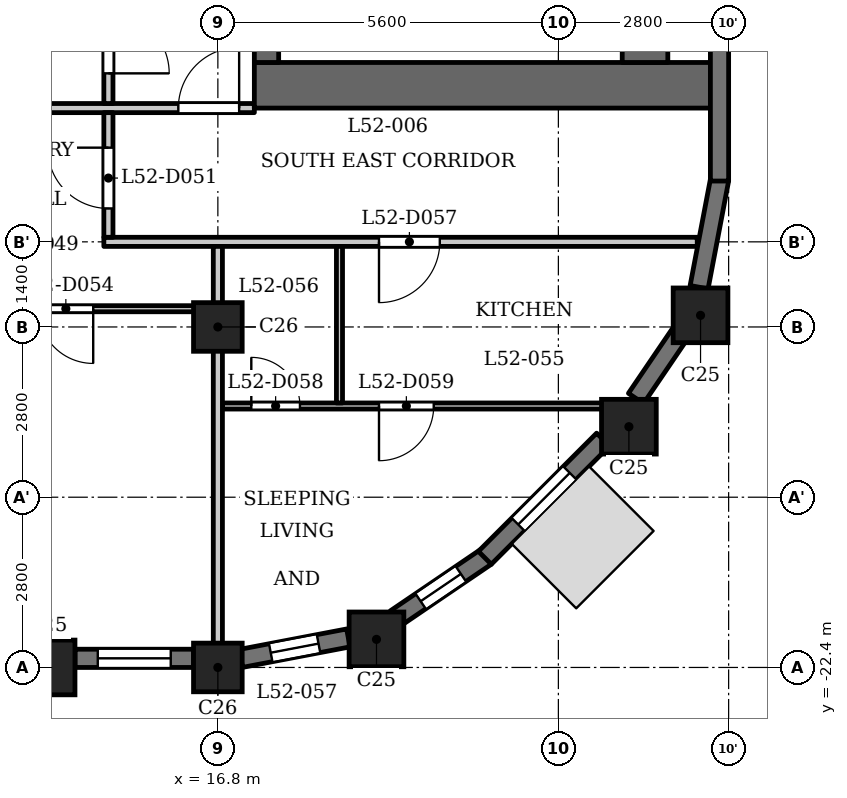
"""IFC4 building model, lengths in metres.
Left out: names, types, materials, properties, quantities, classifications, styles, units other than length and angle.
Written with IfcOpenShell. Run it as: python <this file> out.ifc"""

import sys

from ifc_helpers import new_model, si_unit, direction, frame, frame_2d, origin, origin_2d, place, context, subcontext, project, spatial, rectangle, extrude, element, fill, save


model = new_model("IFC4")
c1 = context("Model", 3, precision=1e-05, world=origin(), true_north=direction((0.0, 1.0)))
c2 = subcontext(c1, "Body", "Model", "MODEL_VIEW")
j1 = project(units=[si_unit("LENGTHUNIT", "METRE"), si_unit("PLANEANGLEUNIT", "RADIAN")], contexts=[c1])
p1 = place(None, origin())
s1 = spatial("IfcSite", under=j1, at=p1, CompositionType="ELEMENT")
p2 = place(p1, origin())
s2 = spatial("IfcBuilding", under=s1, at=p2, CompositionType="ELEMENT")
p3 = place(p2, frame((0.0, 0.0, 202.9)))
s3 = spatial("IfcBuildingStorey", under=s2, at=p3, CompositionType="ELEMENT", Elevation=202.9)
for number, where, z_axis, x_axis in (
    (1, (14.0, -22.4, 0.0), (0.0, 0.0, 1.0), (1.0, 0.0, 0.0)),
    (2, (19.409, -21.938, 0.0), (0.0, 0.0, 1.0), (1.0, 0.0, 0.0)),
    (3, (23.56, -18.44, 0.0), (0.0, 0.0, 1.0), (1.0, 0.0, 0.0)),
    (4, (24.738, -16.609, 0.0), (0.0, 0.0, 1.0), (1.0, 0.0, 0.0)),
):
    element("IfcColumn", number, at=place(p3, frame(where, z_axis=z_axis, x_axis=x_axis)), inside=s3, PredefinedType="COLUMN", context=c2, shape_type="SweptSolid", body=[
        extrude(rectangle(XDim=0.9, YDim=0.9, at=origin_2d()), origin(), (0.0, 0.0, 1.0), 3.5),
    ])
for number, where, z_axis, x_axis in (
    (5, (16.8, -22.4, 0.0), (0.0, 0.0, 1.0), (1.0, 0.0, 0.0)),
    (6, (16.8, -16.8, 0.0), (0.0, 0.0, 1.0), (1.0, 0.0, 0.0)),
):
    element("IfcColumn", number, at=place(p3, frame(where, z_axis=z_axis, x_axis=x_axis)), inside=s3, PredefinedType="COLUMN", context=c2, shape_type="SweptSolid", body=[
        extrude(rectangle(XDim=0.8, YDim=0.8, at=origin_2d()), origin(), (0.0, 0.0, 1.0), 3.5),
    ])
p4 = place(p3, frame((14.45, -22.25, 0.0), z_axis=(0.0, 0.0, 1.0), x_axis=(1.0, 0.0, 0.0)))
e7 = element("IfcWall", 7, at=p4, inside=s3, PredefinedType="SOLIDWALL", context=c2, shape_type="SweptSolid", body=[
    extrude(rectangle(XDim=1.95, YDim=0.3, at=frame_2d((0.975, 0.0))), origin(), (0.0, 0.0, 1.0), 2.5),
])
p5 = place(p4, frame((0.375, 0.0, 0.6)))
e8 = element("IfcOpeningElement", 8, at=p5, cuts=e7, PredefinedType="OPENING", context=c2, shape_type="SweptSolid", body=[
    extrude(rectangle(XDim=1.2, YDim=1.55, at=frame_2d((0.6, 0.775))), frame((0.0, 0.16, 0.0), z_axis=(0.0, -1.0, 0.0), x_axis=(1.0, 0.0, 0.0)), (0.0, 0.0, 1.0), 0.32),
])
p6 = place(p3, frame((17.179, -22.251, 0.0), z_axis=(0.0, 0.0, 1.0), x_axis=(0.98230529033, 0.187286722942, 0.0)))
e9 = element("IfcWall", 9, at=p6, inside=s3, PredefinedType="SOLIDWALL", context=c2, shape_type="SweptSolid", body=[
    extrude(rectangle(XDim=1.799, YDim=0.3, at=frame_2d((0.899, 0.0))), origin(), (0.0, 0.0, 1.0), 2.5),
])
p7 = place(p6, frame((0.5, 0.0, 0.6)))
e10 = element("IfcOpeningElement", 10, at=p7, cuts=e9, PredefinedType="OPENING", context=c2, shape_type="SweptSolid", body=[
    extrude(rectangle(XDim=0.8, YDim=1.55, at=frame_2d((0.4, 0.775))), frame((0.0, 0.16, 0.0), z_axis=(0.0, -1.0, 0.0), x_axis=(1.0, 0.0, 0.0)), (0.0, 0.0, 1.0), 0.32),
])
p8 = place(p3, frame((19.719, -21.594, 0.0), z_axis=(0.0, 0.0, 1.0), x_axis=(0.827067282455, 0.562102935673, 0.0)))
e11 = element("IfcWall", 11, at=p8, inside=s3, PredefinedType="SOLIDWALL", context=c2, shape_type="SweptSolid", body=[
    extrude(rectangle(XDim=1.806, YDim=0.3, at=frame_2d((0.903, 0.0))), origin(), (0.0, 0.0, 1.0), 2.5),
])
p9 = place(p8, frame((0.503, 0.0, 0.6)))
e12 = element("IfcOpeningElement", 12, at=p9, cuts=e11, PredefinedType="OPENING", context=c2, shape_type="SweptSolid", body=[
    extrude(rectangle(XDim=0.8, YDim=1.55, at=frame_2d((0.4, 0.775))), frame((0.0, 0.16, 0.0), z_axis=(0.0, -1.0, 0.0), x_axis=(1.0, 0.0, 0.0)), (0.0, 0.0, 1.0), 0.32),
])
p10 = place(p3, frame((21.191, -20.597, 0.0), z_axis=(0.0, 0.0, 1.0), x_axis=(0.707106781187, 0.707106781187, 0.0)))
e13 = element("IfcWall", 13, at=p10, inside=s3, PredefinedType="SOLIDWALL", context=c2, shape_type="SweptSolid", body=[
    extrude(rectangle(XDim=2.75, YDim=0.3, at=frame_2d((1.375, 0.0))), origin(), (0.0, 0.0, 1.0), 2.5),
])
p11 = place(p10, frame((0.775, 0.0, 0.6)))
e14 = element("IfcOpeningElement", 14, at=p11, cuts=e13, PredefinedType="OPENING", context=c2, shape_type="SweptSolid", body=[
    extrude(rectangle(XDim=1.2, YDim=1.55, at=frame_2d((0.6, 0.775))), frame((0.0, 0.16, 0.0), z_axis=(0.0, -1.0, 0.0), x_axis=(1.0, 0.0, 0.0)), (0.0, 0.0, 1.0), 0.32),
])
p12 = place(p3, frame((23.676, -17.975, 0.0), z_axis=(0.0, 0.0, 1.0), x_axis=(0.56200149592, 0.827136215253, 0.0)))
e15 = element("IfcWall", 15, at=p12, inside=s3, PredefinedType="SOLIDWALL", context=c2, shape_type="SweptSolid", body=[
    extrude(rectangle(XDim=1.277, YDim=0.3, at=frame_2d((0.639, 0.0))), origin(), (0.0, 0.0, 1.0), 2.5),
])
p13 = place(p3, frame((24.714, -16.146, 0.0), z_axis=(0.0, 0.0, 1.0), x_axis=(0.187348135549, 0.982293579388, 0.0)))
e16 = element("IfcWall", 16, at=p13, inside=s3, PredefinedType="SOLIDWALL", context=c2, shape_type="SweptSolid", body=[
    extrude(rectangle(XDim=1.806, YDim=0.3, at=frame_2d((0.903, 0.0))), origin(), (0.0, 0.0, 1.0), 2.5),
])
p14 = place(p3, frame((25.05, -14.4, 0.0), z_axis=(0.0, 0.0, 1.0), x_axis=(0.0, 1.0, 0.0)))
e17 = element("IfcWall", 17, at=p14, inside=s3, PredefinedType="SOLIDWALL", context=c2, shape_type="SweptSolid", body=[
    extrude(rectangle(XDim=2.75, YDim=0.3, at=frame_2d((1.375, 0.0))), origin(), (0.0, 0.0, 1.0), 2.5),
])
p15 = place(p3, frame((17.4, -12.825, 0.0), z_axis=(0.0, 0.0, 1.0), x_axis=(1.0, 0.0, 0.0)))
e18 = element("IfcWall", 18, at=p15, inside=s3, PredefinedType="SHEAR", context=c2, shape_type="SweptSolid", body=[
    extrude(rectangle(XDim=7.6, YDim=0.75, at=frame_2d((3.8, 0.0))), origin(), (0.0, 0.0, 1.0), 3.2),
])
p16 = place(p3, frame((17.6, -12.45, 0.0), z_axis=(0.0, 0.0, 1.0), x_axis=(0.0, 1.0, 0.0)))
e19 = element("IfcWall", 19, at=p16, inside=s3, PredefinedType="SHEAR", context=c2, shape_type="SweptSolid", body=[
    extrude(rectangle(XDim=24.9, YDim=0.4, at=frame_2d((12.45, 0.0))), origin(), (0.0, 0.0, 1.0), 3.2),
])
p17 = place(p16, frame((8.65, 0.0, 0.0)))
e20 = element("IfcOpeningElement", 20, at=p17, cuts=e19, PredefinedType="OPENING", context=c2, shape_type="SweptSolid", body=[
    extrude(rectangle(XDim=0.9, YDim=2.1, at=frame_2d((0.45, 1.05))), frame((0.0, 0.21, 0.0), z_axis=(0.0, -1.0, 0.0), x_axis=(1.0, 0.0, 0.0)), (0.0, 0.0, 1.0), 0.42),
])
p18 = place(p16, frame((15.6, 0.0, 0.0)))
e21 = element("IfcOpeningElement", 21, at=p18, cuts=e19, PredefinedType="OPENING", context=c2, shape_type="SweptSolid", body=[
    extrude(rectangle(XDim=1.1, YDim=2.1, at=frame_2d((0.55, 1.05))), frame((0.0, 0.21, 0.0), z_axis=(0.0, -1.0, 0.0), x_axis=(1.0, 0.0, 0.0)), (0.0, 0.0, 1.0), 0.42),
])
p19 = place(p16, frame((18.0, 0.0, 0.0)))
e22 = element("IfcOpeningElement", 22, at=p19, cuts=e19, PredefinedType="OPENING", context=c2, shape_type="SweptSolid", body=[
    extrude(rectangle(XDim=1.1, YDim=2.1, at=frame_2d((0.55, 1.05))), frame((0.0, 0.21, 0.0), z_axis=(0.0, -1.0, 0.0), x_axis=(1.0, 0.0, 0.0)), (0.0, 0.0, 1.0), 0.42),
])
p20 = place(p16, frame((23.025, 0.0, 0.0)))
e23 = element("IfcOpeningElement", 23, at=p20, cuts=e19, PredefinedType="OPENING", context=c2, shape_type="SweptSolid", body=[
    extrude(rectangle(XDim=1.1, YDim=2.1, at=frame_2d((0.55, 1.05))), frame((0.0, 0.21, 0.0), z_axis=(0.0, -1.0, 0.0), x_axis=(1.0, 0.0, 0.0)), (0.0, 0.0, 1.0), 0.42),
])
p21 = place(p16, frame((0.775, 0.0, 0.0)))
e24 = element("IfcOpeningElement", 24, at=p21, cuts=e19, PredefinedType="OPENING", context=c2, shape_type="SweptSolid", body=[
    extrude(rectangle(XDim=1.1, YDim=2.1, at=frame_2d((0.55, 1.05))), frame((0.0, 0.21, 0.0), z_axis=(0.0, -1.0, 0.0), x_axis=(1.0, 0.0, 0.0)), (0.0, 0.0, 1.0), 0.42),
])
p22 = place(p16, frame((12.925, 0.0, 0.0)))
e25 = element("IfcOpeningElement", 25, at=p22, cuts=e19, PredefinedType="OPENING", context=c2, shape_type="SweptSolid", body=[
    extrude(rectangle(XDim=1.8, YDim=2.1, at=frame_2d((0.9, 1.05))), frame((0.0, 0.21, 0.0), z_axis=(0.0, -1.0, 0.0), x_axis=(1.0, 0.0, 0.0)), (0.0, 0.0, 1.0), 0.42),
])
p23 = place(p3, frame((23.825, -12.45, 0.0), z_axis=(0.0, 0.0, 1.0), x_axis=(0.0, 1.0, 0.0)))
e26 = element("IfcWall", 26, at=p23, inside=s3, PredefinedType="SHEAR", context=c2, shape_type="SweptSolid", body=[
    extrude(rectangle(XDim=24.9, YDim=0.75, at=frame_2d((12.45, 0.0))), origin(), (0.0, 0.0, 1.0), 3.2),
])
p24 = place(p3, frame((16.875, -18.1, 0.0), z_axis=(0.0, 0.0, 1.0), x_axis=(1.0, 0.0, 0.0)))
e27 = element("IfcWall", 27, at=p24, inside=s3, PredefinedType="PARTITIONING", context=c2, shape_type="SweptSolid", body=[
    extrude(rectangle(XDim=6.765, YDim=0.1, at=frame_2d((3.382, 0.0))), origin(), (0.0, 0.0, 1.0), 3.2),
])
p25 = place(p24, frame((0.475, 0.0, 0.0)))
e28 = element("IfcOpeningElement", 28, at=p25, cuts=e27, PredefinedType="OPENING", context=c2, shape_type="SweptSolid", body=[
    extrude(rectangle(XDim=0.8, YDim=2.1, at=frame_2d((0.4, 1.05))), frame((0.0, 0.06, 0.0), z_axis=(0.0, -1.0, 0.0), x_axis=(1.0, 0.0, 0.0)), (0.0, 0.0, 1.0), 0.12),
])
p26 = place(p24, frame((2.575, 0.0, 0.0)))
e29 = element("IfcOpeningElement", 29, at=p26, cuts=e27, PredefinedType="OPENING", context=c2, shape_type="SweptSolid", body=[
    extrude(rectangle(XDim=0.9, YDim=2.1, at=frame_2d((0.45, 1.05))), frame((0.0, 0.06, 0.0), z_axis=(0.0, -1.0, 0.0), x_axis=(1.0, 0.0, 0.0)), (0.0, 0.0, 1.0), 0.12),
])
p27 = place(p3, frame((-16.725, -16.5, 0.0), z_axis=(0.0, 0.0, 1.0), x_axis=(1.0, 0.0, 0.0)))
e30 = element("IfcWall", 30, at=p27, inside=s3, PredefinedType="PARTITIONING", context=c2, shape_type="SweptSolid", body=[
    extrude(rectangle(XDim=33.45, YDim=0.1, at=frame_2d((16.725, 0.0))), origin(), (0.0, 0.0, 1.0), 3.2),
])
p28 = place(p27, frame((4.075, 0.0, 0.0)))
e31 = element("IfcOpeningElement", 31, at=p28, cuts=e30, PredefinedType="OPENING", context=c2, shape_type="SweptSolid", body=[
    extrude(rectangle(XDim=0.9, YDim=2.1, at=frame_2d((0.45, 1.05))), frame((0.0, 0.06, 0.0), z_axis=(0.0, -1.0, 0.0), x_axis=(1.0, 0.0, 0.0)), (0.0, 0.0, 1.0), 0.12),
])
p29 = place(p27, frame((6.175, 0.0, 0.0)))
e32 = element("IfcOpeningElement", 32, at=p29, cuts=e30, PredefinedType="OPENING", context=c2, shape_type="SweptSolid", body=[
    extrude(rectangle(XDim=0.9, YDim=2.1, at=frame_2d((0.45, 1.05))), frame((0.0, 0.06, 0.0), z_axis=(0.0, -1.0, 0.0), x_axis=(1.0, 0.0, 0.0)), (0.0, 0.0, 1.0), 0.12),
])
p30 = place(p27, frame((30.575, 0.0, 0.0)))
e33 = element("IfcOpeningElement", 33, at=p30, cuts=e30, PredefinedType="OPENING", context=c2, shape_type="SweptSolid", body=[
    extrude(rectangle(XDim=0.9, YDim=2.1, at=frame_2d((0.45, 1.05))), frame((0.0, 0.06, 0.0), z_axis=(0.0, -1.0, 0.0), x_axis=(1.0, 0.0, 0.0)), (0.0, 0.0, 1.0), 0.12),
])
p31 = place(p27, frame((22.975, 0.0, 0.0)))
e34 = element("IfcOpeningElement", 34, at=p31, cuts=e30, PredefinedType="OPENING", context=c2, shape_type="SweptSolid", body=[
    extrude(rectangle(XDim=0.9, YDim=2.1, at=frame_2d((0.45, 1.05))), frame((0.0, 0.06, 0.0), z_axis=(0.0, -1.0, 0.0), x_axis=(1.0, 0.0, 0.0)), (0.0, 0.0, 1.0), 0.12),
])
p32 = place(p3, frame((14.925, -15.4, 0.0), z_axis=(0.0, 0.0, 1.0), x_axis=(1.0, 0.0, 0.0)))
e35 = element("IfcWall", 35, at=p32, inside=s3, PredefinedType="PARTITIONING", context=c2, shape_type="SweptSolid", body=[
    extrude(rectangle(XDim=9.759, YDim=0.15, at=frame_2d((4.879, 0.0))), origin(), (0.0, 0.0, 1.0), 3.2),
])
p33 = place(p32, frame((4.525, 0.0, 0.0)))
e36 = element("IfcOpeningElement", 36, at=p33, cuts=e35, PredefinedType="OPENING", context=c2, shape_type="SweptSolid", body=[
    extrude(rectangle(XDim=1.0, YDim=2.1, at=frame_2d((0.5, 1.05))), frame((0.0, 0.085, 0.0), z_axis=(0.0, -1.0, 0.0), x_axis=(1.0, 0.0, 0.0)), (0.0, 0.0, 1.0), 0.17),
])
p34 = place(p3, frame((-17.4, -13.2, 0.0), z_axis=(0.0, 0.0, 1.0), x_axis=(1.0, 0.0, 0.0)))
e37 = element("IfcWall", 37, at=p34, inside=s3, PredefinedType="PARTITIONING", context=c2, shape_type="SweptSolid", body=[
    extrude(rectangle(XDim=34.8, YDim=0.15, at=frame_2d((17.4, 0.0))), origin(), (0.0, 0.0, 1.0), 3.2),
])
p35 = place(p34, frame((0.15, 0.0, 0.0)))
e38 = element("IfcOpeningElement", 38, at=p35, cuts=e37, PredefinedType="OPENING", context=c2, shape_type="SweptSolid", body=[
    extrude(rectangle(XDim=1.0, YDim=2.1, at=frame_2d((0.5, 1.05))), frame((0.0, 0.085, 0.0), z_axis=(0.0, -1.0, 0.0), x_axis=(1.0, 0.0, 0.0)), (0.0, 0.0, 1.0), 0.17),
])
p36 = place(p34, frame((33.55, 0.0, 0.0)))
e39 = element("IfcOpeningElement", 39, at=p36, cuts=e37, PredefinedType="OPENING", context=c2, shape_type="SweptSolid", body=[
    extrude(rectangle(XDim=1.0, YDim=2.1, at=frame_2d((0.5, 1.05))), frame((0.0, 0.085, 0.0), z_axis=(0.0, -1.0, 0.0), x_axis=(1.0, 0.0, 0.0)), (0.0, 0.0, 1.0), 0.17),
])
p37 = place(p3, frame((15.0, -15.325, 0.0), z_axis=(0.0, 0.0, 1.0), x_axis=(0.0, 1.0, 0.0)))
e40 = element("IfcWall", 40, at=p37, inside=s3, PredefinedType="PARTITIONING", context=c2, shape_type="SweptSolid", body=[
    extrude(rectangle(XDim=2.05, YDim=0.15, at=frame_2d((1.025, 0.0))), origin(), (0.0, 0.0, 1.0), 3.2),
])
p38 = place(p37, frame((0.474, 0.0, 0.0)))
e41 = element("IfcOpeningElement", 41, at=p38, cuts=e40, PredefinedType="OPENING", context=c2, shape_type="SweptSolid", body=[
    extrude(rectangle(XDim=1.0, YDim=2.1, at=frame_2d((0.5, 1.05))), frame((0.0, 0.085, 0.0), z_axis=(0.0, -1.0, 0.0), x_axis=(1.0, 0.0, 0.0)), (0.0, 0.0, 1.0), 0.17),
])
p39 = place(p3, frame((15.0, -13.125, 0.0), z_axis=(0.0, 0.0, 1.0), x_axis=(0.0, 1.0, 0.0)))
e42 = element("IfcWall", 42, at=p39, inside=s3, PredefinedType="PARTITIONING", context=c2, shape_type="SweptSolid", body=[
    extrude(rectangle(XDim=6.356, YDim=0.15, at=frame_2d((3.178, 0.0))), origin(), (0.0, 0.0, 1.0), 3.2),
])
p40 = place(p39, frame((0.496, 0.0, 0.0)))
e43 = element("IfcOpeningElement", 43, at=p40, cuts=e42, PredefinedType="OPENING", context=c2, shape_type="SweptSolid", body=[
    extrude(rectangle(XDim=1.0, YDim=2.1, at=frame_2d((0.5, 1.05))), frame((0.0, 0.085, 0.0), z_axis=(0.0, -1.0, 0.0), x_axis=(1.0, 0.0, 0.0)), (0.0, 0.0, 1.0), 0.17),
])
p41 = place(p3, frame((16.8, -22.31, 0.0), z_axis=(0.0, 0.0, 1.0), x_axis=(0.0, 1.0, 0.0)))
e44 = element("IfcWall", 44, at=p41, inside=s3, PredefinedType="PARTITIONING", context=c2, shape_type="SweptSolid", body=[
    extrude(rectangle(XDim=6.835, YDim=0.15, at=frame_2d((3.417, 0.0))), origin(), (0.0, 0.0, 1.0), 2.55),
])
p42 = place(p3, frame((18.8, -18.05, 0.0), z_axis=(0.0, 0.0, 1.0), x_axis=(0.0, 1.0, 0.0)))
e45 = element("IfcWall", 45, at=p42, inside=s3, PredefinedType="PARTITIONING", context=c2, shape_type="SweptSolid", body=[
    extrude(rectangle(XDim=2.575, YDim=0.1, at=frame_2d((1.288, 0.0))), origin(), (0.0, 0.0, 1.0), 3.2),
])
p43 = place(p40, origin())
e46 = element("IfcDoor", 46, at=p43, inside=s3, OperationType="SINGLE_SWING_LEFT", PredefinedType="DOOR", context=c2, shape_type="SweptSolid", body=[
    extrude(rectangle(XDim=1.0, YDim=2.1, at=frame_2d((0.5, 1.05))), frame((0.0, 0.025, 0.0), z_axis=(0.0, -1.0, 0.0), x_axis=(1.0, 0.0, 0.0)), (0.0, 0.0, 1.0), 0.05),
])
fill(e43, e46)
p44 = place(p36, origin())
e47 = element("IfcDoor", 47, at=p44, inside=s3, OperationType="SINGLE_SWING_LEFT", PredefinedType="DOOR", context=c2, shape_type="SweptSolid", body=[
    extrude(rectangle(XDim=1.0, YDim=2.1, at=frame_2d((0.5, 1.05))), frame((0.0, 0.025, 0.0), z_axis=(0.0, -1.0, 0.0), x_axis=(1.0, 0.0, 0.0)), (0.0, 0.0, 1.0), 0.05),
])
fill(e39, e47)
p45 = place(p38, origin())
e48 = element("IfcDoor", 48, at=p45, inside=s3, OperationType="SINGLE_SWING_LEFT", PredefinedType="DOOR", context=c2, shape_type="SweptSolid", body=[
    extrude(rectangle(XDim=1.0, YDim=2.1, at=frame_2d((0.5, 1.05))), frame((0.0, 0.025, 0.0), z_axis=(0.0, -1.0, 0.0), x_axis=(1.0, 0.0, 0.0)), (0.0, 0.0, 1.0), 0.05),
])
fill(e41, e48)
p46 = place(p30, origin())
e49 = element("IfcDoor", 49, at=p46, inside=s3, OperationType="SINGLE_SWING_RIGHT", PredefinedType="DOOR", context=c2, shape_type="SweptSolid", body=[
    extrude(rectangle(XDim=0.9, YDim=2.1, at=frame_2d((0.45, 1.05))), frame((0.0, 0.025, 0.0), z_axis=(0.0, -1.0, 0.0), x_axis=(1.0, 0.0, 0.0)), (0.0, 0.0, 1.0), 0.05),
])
fill(e33, e49)
p47 = place(p33, origin())
e50 = element("IfcDoor", 50, at=p47, inside=s3, OperationType="SINGLE_SWING_LEFT", PredefinedType="DOOR", context=c2, shape_type="SweptSolid", body=[
    extrude(rectangle(XDim=1.0, YDim=2.1, at=frame_2d((0.5, 1.05))), frame((0.0, 0.025, 0.0), z_axis=(0.0, -1.0, 0.0), x_axis=(1.0, 0.0, 0.0)), (0.0, 0.0, 1.0), 0.05),
])
fill(e36, e50)
p48 = place(p25, origin())
e51 = element("IfcDoor", 51, at=p48, inside=s3, OperationType="SINGLE_SWING_RIGHT", PredefinedType="DOOR", context=c2, shape_type="SweptSolid", body=[
    extrude(rectangle(XDim=0.8, YDim=2.1, at=frame_2d((0.4, 1.05))), frame((0.0, 0.025, 0.0), z_axis=(0.0, -1.0, 0.0), x_axis=(1.0, 0.0, 0.0)), (0.0, 0.0, 1.0), 0.05),
])
fill(e28, e51)
p49 = place(p26, origin())
e52 = element("IfcDoor", 52, at=p49, inside=s3, OperationType="SINGLE_SWING_LEFT", PredefinedType="DOOR", context=c2, shape_type="SweptSolid", body=[
    extrude(rectangle(XDim=0.9, YDim=2.1, at=frame_2d((0.45, 1.05))), frame((0.0, 0.025, 0.0), z_axis=(0.0, -1.0, 0.0), x_axis=(1.0, 0.0, 0.0)), (0.0, 0.0, 1.0), 0.05),
])
fill(e29, e52)
p50 = place(p5, origin())
e53 = element("IfcWindow", 53, at=p50, inside=s3, PartitioningType="SINGLE_PANEL", PredefinedType="WINDOW", context=c2, shape_type="SweptSolid", body=[
    extrude(rectangle(XDim=1.2, YDim=1.55, at=frame_2d((0.6, 0.775))), frame((0.0, 0.03, 0.0), z_axis=(0.0, -1.0, 0.0), x_axis=(1.0, 0.0, 0.0)), (0.0, 0.0, 1.0), 0.06),
])
fill(e8, e53)
p51 = place(p7, origin())
e54 = element("IfcWindow", 54, at=p51, inside=s3, PartitioningType="SINGLE_PANEL", PredefinedType="WINDOW", context=c2, shape_type="SweptSolid", body=[
    extrude(rectangle(XDim=0.8, YDim=1.55, at=frame_2d((0.4, 0.775))), frame((0.0, 0.03, 0.0), z_axis=(0.0, -1.0, 0.0), x_axis=(1.0, 0.0, 0.0)), (0.0, 0.0, 1.0), 0.06),
])
fill(e10, e54)
p52 = place(p9, origin())
e55 = element("IfcWindow", 55, at=p52, inside=s3, PartitioningType="SINGLE_PANEL", PredefinedType="WINDOW", context=c2, shape_type="SweptSolid", body=[
    extrude(rectangle(XDim=0.8, YDim=1.55, at=frame_2d((0.4, 0.775))), frame((0.0, 0.03, 0.0), z_axis=(0.0, -1.0, 0.0), x_axis=(1.0, 0.0, 0.0)), (0.0, 0.0, 1.0), 0.06),
])
fill(e12, e55)
p53 = place(p11, origin())
e56 = element("IfcWindow", 56, at=p53, inside=s3, PartitioningType="SINGLE_PANEL", PredefinedType="WINDOW", context=c2, shape_type="SweptSolid", body=[
    extrude(rectangle(XDim=1.2, YDim=1.55, at=frame_2d((0.6, 0.775))), frame((0.0, 0.03, 0.0), z_axis=(0.0, -1.0, 0.0), x_axis=(1.0, 0.0, 0.0)), (0.0, 0.0, 1.0), 0.06),
])
fill(e14, e56)
save(model, sys.argv[1])
